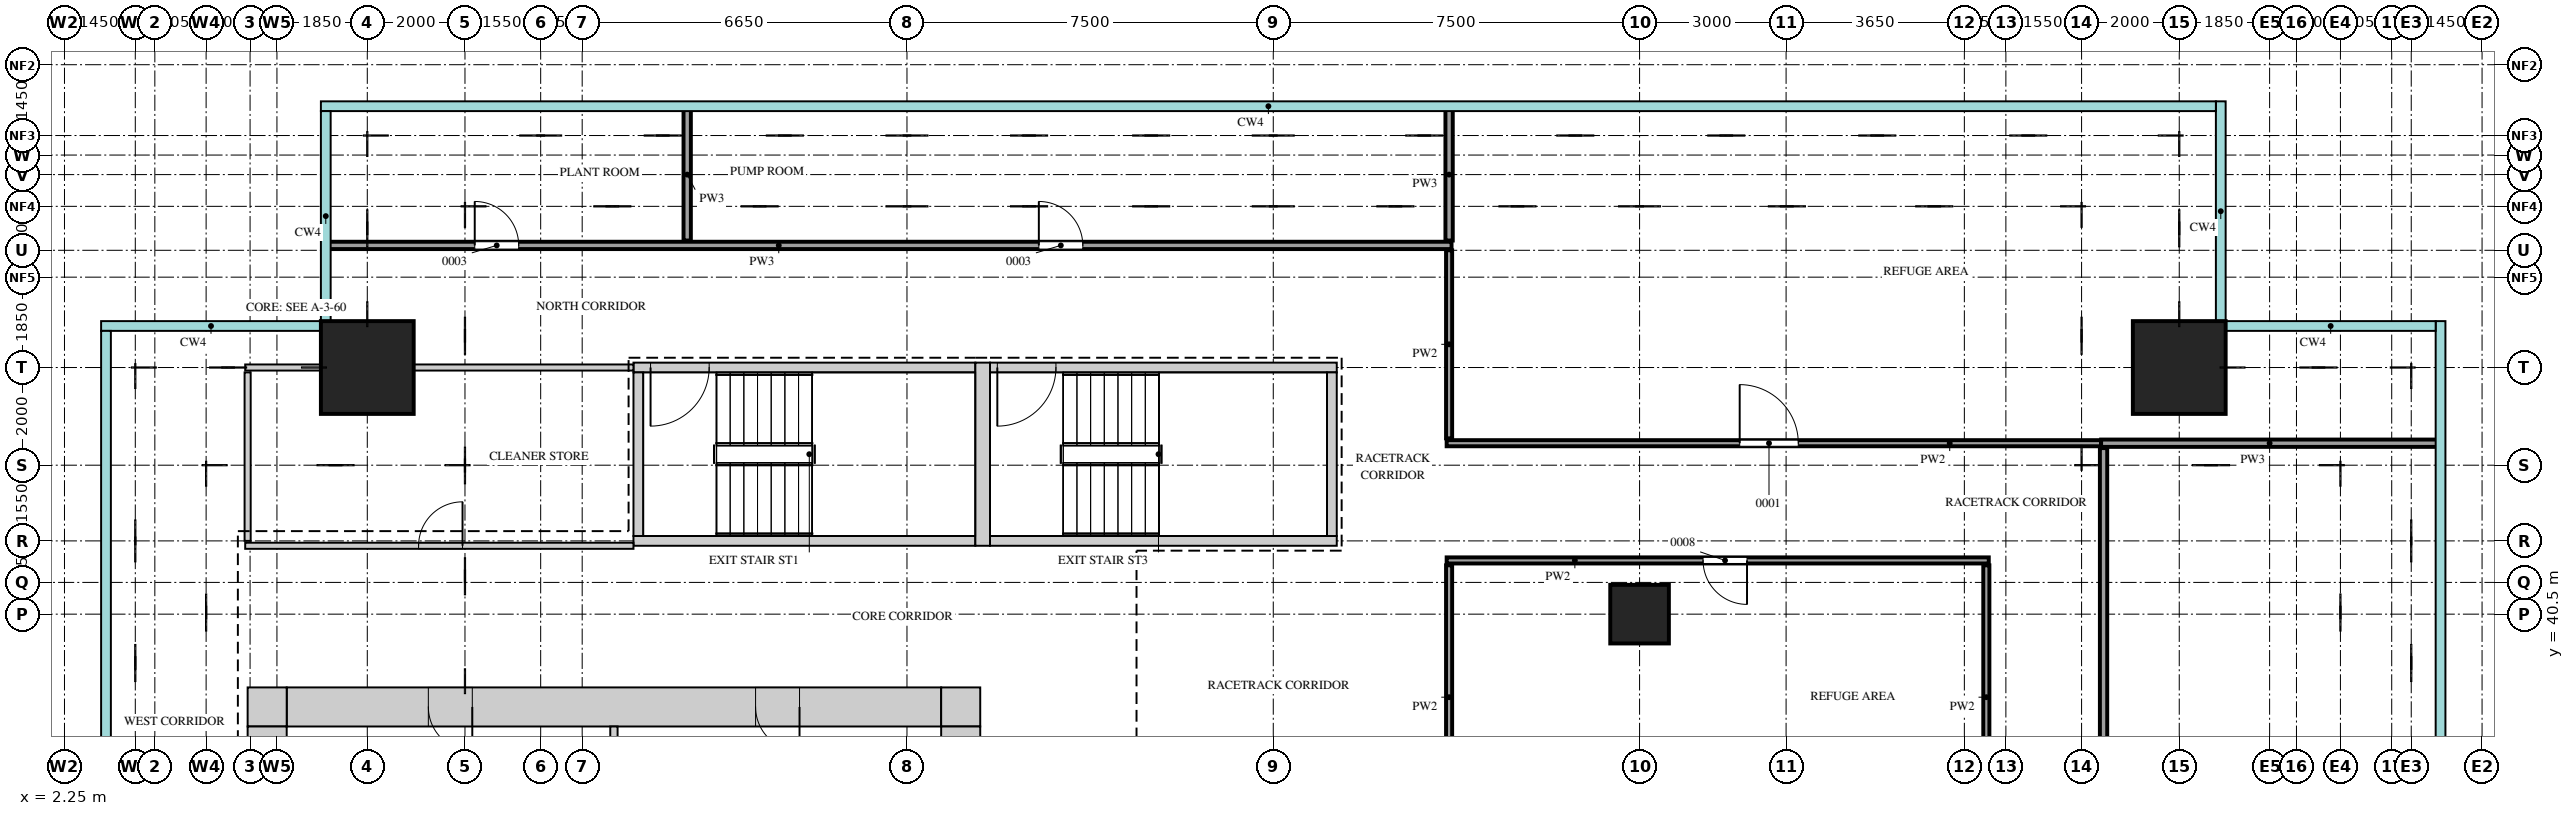
"""IFC4 building model, lengths in metres.
Left out: names, types, materials, properties, quantities, classifications, styles, units other than length and angle.
Written with IfcOpenShell. Run it as: python <this file> out.ifc"""

import sys

from ifc_helpers import new_model, si_unit, direction, frame, frame_2d, origin, origin_2d, place, context, subcontext, project, spatial, rectangle, extrude, source, transform, mapped, element, fill, save


model = new_model("IFC4")
c1 = context("Model", 3, precision=1e-05, world=origin(), true_north=direction((0.0, 1.0)))
c2 = subcontext(c1, "Body", "Model", "MODEL_VIEW")
j1 = project(units=[si_unit("LENGTHUNIT", "METRE"), si_unit("PLANEANGLEUNIT", "RADIAN")], contexts=[c1])
p1 = place(None, origin())
s1 = spatial("IfcSite", under=j1, at=p1, CompositionType="ELEMENT")
p2 = place(p1, origin())
s2 = spatial("IfcBuilding", under=s1, at=p2, CompositionType="ELEMENT")
p3 = place(p2, frame((0.0, 0.0, 216.7)))
s3 = spatial("IfcBuildingStorey", under=s2, at=p3, CompositionType="ELEMENT", Elevation=216.7)
m1 = source(origin(), c2, "Body", "SweptSolid", [
    extrude(rectangle(XDim=13.4, YDim=0.8, at=frame_2d((6.7, 0.0))), origin(), (0.0, 0.0, 1.0), 5.25),
])
p4 = place(p3, frame((6.8, 38.6, 0.0), z_axis=(0.0, 0.0, 1.0), x_axis=(1.0, 0.0, 0.0)))
e1 = element("IfcWall", 1, at=p4, inside=s3, PredefinedType="SHEAR", context=c2, shape_type="MappedRepresentation", body=[
    mapped(m1, transform((0.0, 0.0, 0.0))),
])
m2 = source(origin(), c2, "Body", "SweptSolid", [
    extrude(rectangle(XDim=0.9, YDim=2.1, at=frame_2d((0.45, 1.05))), frame((0.0, 0.41, 0.0), z_axis=(0.0, -1.0, 0.0), x_axis=(1.0, 0.0, 0.0)), (0.0, 0.0, 1.0), 0.82),
])
p5 = place(p4, frame((2.9, 0.0, 0.0)))
e2 = element("IfcOpeningElement", 2, at=p5, cuts=e1, PredefinedType="OPENING", context=c2, shape_type="MappedRepresentation", body=[
    mapped(m2, transform((0.0, 0.0, 0.0))),
])
p6 = place(p4, frame((9.6, 0.0, 0.0)))
e3 = element("IfcOpeningElement", 3, at=p6, cuts=e1, PredefinedType="OPENING", context=c2, shape_type="MappedRepresentation", body=[
    mapped(m2, transform((0.0, 0.0, 0.0))),
])
m3 = source(origin(), c2, "Body", "SweptSolid", [
    extrude(rectangle(XDim=0.8, YDim=0.8, at=frame_2d((0.4, 0.0))), origin(), (0.0, 0.0, 1.0), 5.25),
])
for number, where, z_axis, x_axis in (
    (4, (20.2, 38.6, 0.0), (0.0, 0.0, 1.0), (1.0, 0.0, 0.0)),
    (5, (6.0, 38.6, 0.0), (0.0, 0.0, 1.0), (1.0, 0.0, 0.0)),
):
    element("IfcWall", number, at=place(p3, frame(where, z_axis=z_axis, x_axis=x_axis)), inside=s3, PredefinedType="SHEAR", context=c2, shape_type="MappedRepresentation", body=[
        mapped(m3, transform((0.0, 0.0, 0.0))),
    ])
m4 = source(origin(), c2, "Body", "SweptSolid", [
    extrude(rectangle(XDim=22.4, YDim=0.8, at=frame_2d((11.2, 0.0))), origin(), (0.0, 0.0, 1.0), 5.25),
])
p7 = place(p3, frame((20.6, 15.8, 0.0), z_axis=(0.0, 0.0, 1.0), x_axis=(0.0, 1.0, 0.0)))
e6 = element("IfcWall", 6, at=p7, inside=s3, PredefinedType="SHEAR", context=c2, shape_type="MappedRepresentation", body=[
    mapped(m4, transform((0.0, 0.0, 0.0))),
])
m5 = source(origin(), c2, "Body", "SweptSolid", [
    extrude(rectangle(XDim=1.8, YDim=2.1, at=frame_2d((0.9, 1.05))), frame((0.0, 0.41, 0.0), z_axis=(0.0, -1.0, 0.0), x_axis=(1.0, 0.0, 0.0)), (0.0, 0.0, 1.0), 0.82),
])
p8 = place(p7, frame((10.7, 0.0, 0.0)))
e7 = element("IfcOpeningElement", 7, at=p8, cuts=e6, PredefinedType="OPENING", context=c2, shape_type="MappedRepresentation", body=[
    mapped(m5, transform((0.0, 0.0, 0.0))),
])
p9 = place(p7, frame((1.35, 0.0, 0.0)))
e8 = element("IfcOpeningElement", 8, at=p9, cuts=e6, PredefinedType="OPENING", context=c2, shape_type="MappedRepresentation", body=[
    mapped(m2, transform((0.0, 0.0, 0.0))),
])
p10 = place(p7, frame((4.9, 0.0, 0.0)))
e9 = element("IfcOpeningElement", 9, at=p10, cuts=e6, PredefinedType="OPENING", context=c2, shape_type="MappedRepresentation", body=[
    mapped(m2, transform((0.0, 0.0, 0.0))),
])
p11 = place(p3, frame((6.4, 15.8, 0.0), z_axis=(0.0, 0.0, 1.0), x_axis=(0.0, 1.0, 0.0)))
e10 = element("IfcWall", 10, at=p11, inside=s3, PredefinedType="SHEAR", context=c2, shape_type="MappedRepresentation", body=[
    mapped(m4, transform((0.0, 0.0, 0.0))),
])
m6 = source(origin(), c2, "Body", "SweptSolid", [
    extrude(rectangle(XDim=7.0, YDim=0.2, at=frame_2d((3.5, 0.0))), origin(), (0.0, 0.0, 1.0), 5.25),
])
p12 = place(p3, frame((13.9, 45.55, 0.0), z_axis=(0.0, 0.0, 1.0), x_axis=(1.0, 0.0, 0.0)))
e11 = element("IfcWall", 11, at=p12, inside=s3, PredefinedType="SHEAR", context=c2, shape_type="MappedRepresentation", body=[
    mapped(m6, transform((0.0, 0.0, 0.0))),
])
m7 = source(origin(), c2, "Body", "SweptSolid", [
    extrude(rectangle(XDim=1.2, YDim=2.1, at=frame_2d((0.6, 1.05))), frame((0.0, 0.11, 0.0), z_axis=(0.0, -1.0, 0.0), x_axis=(1.0, 0.0, 0.0)), (0.0, 0.0, 1.0), 0.22),
])
p13 = place(p12, frame((0.35, 0.0, 0.0)))
e12 = element("IfcOpeningElement", 12, at=p13, cuts=e11, PredefinedType="OPENING", context=c2, shape_type="MappedRepresentation", body=[
    mapped(m7, transform((0.0, 0.0, 0.0))),
])
p14 = place(p3, frame((13.9, 42.0, 0.0), z_axis=(0.0, 0.0, 1.0), x_axis=(1.0, 0.0, 0.0)))
e13 = element("IfcWall", 13, at=p14, inside=s3, PredefinedType="SHEAR", context=c2, shape_type="MappedRepresentation", body=[
    mapped(m6, transform((0.0, 0.0, 0.0))),
])
m8 = source(origin(), c2, "Body", "SweptSolid", [
    extrude(rectangle(XDim=7.1, YDim=0.2, at=frame_2d((3.55, 0.0))), origin(), (0.0, 0.0, 1.0), 5.25),
])
p15 = place(p3, frame((21.2, 45.55, 0.0), z_axis=(0.0, 0.0, 1.0), x_axis=(1.0, 0.0, 0.0)))
e14 = element("IfcWall", 14, at=p15, inside=s3, PredefinedType="SHEAR", context=c2, shape_type="MappedRepresentation", body=[
    mapped(m8, transform((0.0, 0.0, 0.0))),
])
p16 = place(p15, frame((0.15, 0.0, 0.0)))
e15 = element("IfcOpeningElement", 15, at=p16, cuts=e14, PredefinedType="OPENING", context=c2, shape_type="MappedRepresentation", body=[
    mapped(m7, transform((0.0, 0.0, 0.0))),
])
p17 = place(p3, frame((21.2, 42.0, 0.0), z_axis=(0.0, 0.0, 1.0), x_axis=(1.0, 0.0, 0.0)))
e16 = element("IfcWall", 16, at=p17, inside=s3, PredefinedType="SHEAR", context=c2, shape_type="MappedRepresentation", body=[
    mapped(m8, transform((0.0, 0.0, 0.0))),
])
m9 = source(origin(), c2, "Body", "SweptSolid", [
    extrude(rectangle(XDim=3.75, YDim=0.3, at=frame_2d((1.875, 0.0))), origin(), (0.0, 0.0, 1.0), 5.25),
])
p18 = place(p3, frame((21.05, 41.9, 0.0), z_axis=(0.0, 0.0, 1.0), x_axis=(0.0, 1.0, 0.0)))
e17 = element("IfcWall", 17, at=p18, inside=s3, PredefinedType="SHEAR", context=c2, shape_type="MappedRepresentation", body=[
    mapped(m9, transform((0.0, 0.0, 0.0))),
])
m10 = source(origin(), c2, "Body", "SweptSolid", [
    extrude(rectangle(XDim=3.35, YDim=0.2, at=frame_2d((1.675, 0.0))), origin(), (0.0, 0.0, 1.0), 5.25),
])
for number, where, z_axis, x_axis in (
    (18, (14.0, 42.1, 0.0), (0.0, 0.0, 1.0), (0.0, 1.0, 0.0)),
    (19, (28.2, 42.1, 0.0), (0.0, 0.0, 1.0), (0.0, 1.0, 0.0)),
):
    element("IfcWall", number, at=place(p3, frame(where, z_axis=z_axis, x_axis=x_axis)), inside=s3, PredefinedType="SHEAR", context=c2, shape_type="MappedRepresentation", body=[
        mapped(m10, transform((0.0, 0.0, 0.0))),
    ])
m11 = source(origin(), c2, "Body", "SweptSolid", [
    extrude(rectangle(XDim=1.9, YDim=1.9, at=origin_2d()), origin(), (0.0, 0.0, 1.0), 5.5),
])
for number, where, z_axis, x_axis in (
    (20, (45.55, 45.55, 0.0), (0.0, 0.0, 1.0), (1.0, 0.0, 0.0)),
    (21, (8.45, 45.55, 0.0), (0.0, 0.0, 1.0), (1.0, 0.0, 0.0)),
):
    element("IfcColumn", number, at=place(p3, frame(where, z_axis=z_axis, x_axis=x_axis)), inside=s3, PredefinedType="COLUMN", context=c2, shape_type="MappedRepresentation", body=[
        mapped(m11, transform((0.0, 0.0, 0.0))),
    ])
m12 = source(origin(), c2, "Body", "SweptSolid", [
    extrude(rectangle(XDim=1.2, YDim=1.2, at=origin_2d()), origin(), (0.0, 0.0, 1.0), 5.25),
])
p19 = place(p3, frame((34.5, 40.5, 0.0), z_axis=(0.0, 0.0, 1.0), x_axis=(1.0, 0.0, 0.0)))
e22 = element("IfcColumn", 22, at=p19, inside=s3, PredefinedType="COLUMN", context=c2, shape_type="MappedRepresentation", body=[
    mapped(m12, transform((0.0, 0.0, 0.0))),
])
m13 = source(origin(), c2, "Body", "SweptSolid", [
    extrude(rectangle(XDim=33.8, YDim=0.15, at=frame_2d((16.9, 0.0))), origin(), (0.0, 0.0, 1.0), 5.25),
])
p20 = place(p3, frame((44.0, 10.1, 0.0), z_axis=(0.0, 0.0, 1.0), x_axis=(0.0, 1.0, 0.0)))
e23 = element("IfcWall", 23, at=p20, inside=s3, PredefinedType="PARTITIONING", context=c2, shape_type="MappedRepresentation", body=[
    mapped(m13, transform((0.0, 0.0, 0.0))),
])
m14 = source(origin(), c2, "Body", "SweptSolid", [
    extrude(rectangle(XDim=0.9, YDim=2.1, at=frame_2d((0.45, 1.05))), frame((0.0, 0.085, 0.0), z_axis=(0.0, -1.0, 0.0), x_axis=(1.0, 0.0, 0.0)), (0.0, 0.0, 1.0), 0.17),
])
p21 = place(p20, frame((7.5, 0.0, 0.0)))
e24 = element("IfcOpeningElement", 24, at=p21, cuts=e23, PredefinedType="OPENING", context=c2, shape_type="MappedRepresentation", body=[
    mapped(m14, transform((0.0, 0.0, 0.0))),
])
m15 = source(origin(), c2, "Body", "SweptSolid", [
    extrude(rectangle(XDim=1.2, YDim=2.1, at=frame_2d((0.6, 1.05))), frame((0.0, 0.085, 0.0), z_axis=(0.0, -1.0, 0.0), x_axis=(1.0, 0.0, 0.0)), (0.0, 0.0, 1.0), 0.17),
])
p22 = place(p20, frame((22.1, 0.0, 0.0)))
e25 = element("IfcOpeningElement", 25, at=p22, cuts=e23, PredefinedType="OPENING", context=c2, shape_type="MappedRepresentation", body=[
    mapped(m15, transform((0.0, 0.0, 0.0))),
])
m16 = source(origin(), c2, "Body", "SweptSolid", [
    extrude(rectangle(XDim=6.0, YDim=0.15, at=frame_2d((3.0, 0.0))), origin(), (0.0, 0.0, 1.0), 5.25),
])
p23 = place(p3, frame((13.5, 32.2, 0.0), z_axis=(0.0, 0.0, 1.0), x_axis=(0.0, 1.0, 0.0)))
e26 = element("IfcWall", 26, at=p23, inside=s3, PredefinedType="PARTITIONING", context=c2, shape_type="MappedRepresentation", body=[
    mapped(m16, transform((0.0, 0.0, 0.0))),
])
m17 = source(origin(), c2, "Body", "SweptSolid", [
    extrude(rectangle(XDim=5.4, YDim=0.125, at=frame_2d((2.7, 0.0))), origin(), (0.0, 0.0, 1.0), 5.25),
])
for number, where, z_axis, x_axis in (
    (27, (30.6, 36.1, 0.0), (0.0, 0.0, 1.0), (0.0, 1.0, 0.0)),
    (28, (41.6, 36.1, 0.0), (0.0, 0.0, 1.0), (0.0, 1.0, 0.0)),
):
    element("IfcWall", number, at=place(p3, frame(where, z_axis=z_axis, x_axis=x_axis)), inside=s3, PredefinedType="PARTITIONING", context=c2, shape_type="MappedRepresentation", body=[
        mapped(m17, transform((0.0, 0.0, 0.0))),
    ])
m18 = source(origin(), c2, "Body", "SweptSolid", [
    extrude(rectangle(XDim=11.1, YDim=0.125, at=frame_2d((5.55, 0.0))), origin(), (0.0, 0.0, 1.0), 5.25),
])
p24 = place(p3, frame((30.55, 41.6, 0.0), z_axis=(0.0, 0.0, 1.0), x_axis=(1.0, 0.0, 0.0)))
e29 = element("IfcWall", 29, at=p24, inside=s3, PredefinedType="PARTITIONING", context=c2, shape_type="MappedRepresentation", body=[
    mapped(m18, transform((0.0, 0.0, 0.0))),
])
m19 = source(origin(), c2, "Body", "SweptSolid", [
    extrude(rectangle(XDim=0.9, YDim=2.1, at=frame_2d((0.45, 1.05))), frame((0.0, 0.073, 0.0), z_axis=(0.0, -1.0, 0.0), x_axis=(1.0, 0.0, 0.0)), (0.0, 0.0, 1.0), 0.145),
])
p25 = place(p24, frame((5.25, 0.0, 0.0)))
e30 = element("IfcOpeningElement", 30, at=p25, cuts=e29, PredefinedType="OPENING", context=c2, shape_type="MappedRepresentation", body=[
    mapped(m19, transform((0.0, 0.0, 0.0))),
])
m20 = source(origin(), c2, "Body", "SweptSolid", [
    extrude(rectangle(XDim=7.95, YDim=0.125, at=frame_2d((3.975, 0.0))), origin(), (0.0, 0.0, 1.0), 5.25),
])
p26 = place(p3, frame((5.95, 41.9, 0.0), z_axis=(0.0, 0.0, 1.0), x_axis=(1.0, 0.0, 0.0)))
e31 = element("IfcWall", 31, at=p26, inside=s3, PredefinedType="PARTITIONING", context=c2, shape_type="MappedRepresentation", body=[
    mapped(m20, transform((0.0, 0.0, 0.0))),
])
p27 = place(p26, frame((3.55, 0.0, 0.0)))
e32 = element("IfcOpeningElement", 32, at=p27, cuts=e31, PredefinedType="OPENING", context=c2, shape_type="MappedRepresentation", body=[
    mapped(m19, transform((0.0, 0.0, 0.0))),
])
m21 = source(origin(), c2, "Body", "SweptSolid", [
    extrude(rectangle(XDim=3.45, YDim=0.125, at=frame_2d((1.725, 0.0))), origin(), (0.0, 0.0, 1.0), 5.25),
])
p28 = place(p3, frame((6.0, 42.0, 0.0), z_axis=(0.0, 0.0, 1.0), x_axis=(0.0, 1.0, 0.0)))
e33 = element("IfcWall", 33, at=p28, inside=s3, PredefinedType="PARTITIONING", context=c2, shape_type="MappedRepresentation", body=[
    mapped(m21, transform((0.0, 0.0, 0.0))),
])
m22 = source(origin(), c2, "Body", "SweptSolid", [
    extrude(rectangle(XDim=13.4, YDim=0.125, at=frame_2d((6.7, 0.0))), origin(), (0.0, 0.0, 1.0), 5.25),
])
p29 = place(p3, frame((30.55, 44.0, 0.0), z_axis=(0.0, 0.0, 1.0), x_axis=(1.0, 0.0, 0.0)))
e34 = element("IfcWall", 34, at=p29, inside=s3, PredefinedType="PARTITIONING", context=c2, shape_type="MappedRepresentation", body=[
    mapped(m22, transform((0.0, 0.0, 0.0))),
])
m23 = source(origin(), c2, "Body", "SweptSolid", [
    extrude(rectangle(XDim=1.2, YDim=2.1, at=frame_2d((0.6, 1.05))), frame((0.0, 0.073, 0.0), z_axis=(0.0, -1.0, 0.0), x_axis=(1.0, 0.0, 0.0)), (0.0, 0.0, 1.0), 0.145),
])
p30 = place(p29, frame((6.0, 0.0, 0.0)))
e35 = element("IfcOpeningElement", 35, at=p30, cuts=e34, PredefinedType="OPENING", context=c2, shape_type="MappedRepresentation", body=[
    mapped(m23, transform((0.0, 0.0, 0.0))),
])
m24 = source(origin(), c2, "Body", "SweptSolid", [
    extrude(rectangle(XDim=6.9, YDim=0.15, at=frame_2d((3.45, 0.0))), origin(), (0.0, 0.0, 1.0), 5.25),
])
p31 = place(p3, frame((43.95, 44.0, 0.0), z_axis=(0.0, 0.0, 1.0), x_axis=(1.0, 0.0, 0.0)))
e36 = element("IfcWall", 36, at=p31, inside=s3, PredefinedType="PARTITIONING", context=c2, shape_type="MappedRepresentation", body=[
    mapped(m24, transform((0.0, 0.0, 0.0))),
])
m25 = source(origin(), c2, "Body", "SweptSolid", [
    extrude(rectangle(XDim=3.85, YDim=0.125, at=frame_2d((1.925, 0.0))), origin(), (0.0, 0.0, 1.0), 5.25),
])
p32 = place(p3, frame((30.6, 44.1, 0.0), z_axis=(0.0, 0.0, 1.0), x_axis=(0.0, 1.0, 0.0)))
e37 = element("IfcWall", 37, at=p32, inside=s3, PredefinedType="PARTITIONING", context=c2, shape_type="MappedRepresentation", body=[
    mapped(m25, transform((0.0, 0.0, 0.0))),
])
p33 = place(p3, frame((5.95, 45.55, 0.0), z_axis=(0.0, 0.0, 1.0), x_axis=(1.0, 0.0, 0.0)))
e38 = element("IfcWall", 38, at=p33, inside=s3, PredefinedType="PARTITIONING", context=c2, shape_type="MappedRepresentation", body=[
    mapped(m20, transform((0.0, 0.0, 0.0))),
])
m26 = source(origin(), c2, "Body", "SweptSolid", [
    extrude(rectangle(XDim=23.0, YDim=0.15, at=frame_2d((11.5, 0.0))), origin(), (0.0, 0.0, 1.0), 5.25),
])
p34 = place(p3, frame((7.65, 48.05, 0.0), z_axis=(0.0, 0.0, 1.0), x_axis=(1.0, 0.0, 0.0)))
e39 = element("IfcWall", 39, at=p34, inside=s3, PredefinedType="PARTITIONING", context=c2, shape_type="MappedRepresentation", body=[
    mapped(m26, transform((0.0, 0.0, 0.0))),
])
p35 = place(p34, frame((3.0, 0.0, 0.0)))
e40 = element("IfcOpeningElement", 40, at=p35, cuts=e39, PredefinedType="OPENING", context=c2, shape_type="MappedRepresentation", body=[
    mapped(m14, transform((0.0, 0.0, 0.0))),
])
p36 = place(p34, frame((14.55, 0.0, 0.0)))
e41 = element("IfcOpeningElement", 41, at=p36, cuts=e39, PredefinedType="OPENING", context=c2, shape_type="MappedRepresentation", body=[
    mapped(m14, transform((0.0, 0.0, 0.0))),
])
m27 = source(origin(), c2, "Body", "SweptSolid", [
    extrude(rectangle(XDim=2.7, YDim=0.15, at=frame_2d((1.35, 0.0))), origin(), (0.0, 0.0, 1.0), 5.25),
])
for number, where, z_axis, x_axis in (
    (42, (15.0, 48.15, 0.0), (0.0, 0.0, 1.0), (0.0, 1.0, 0.0)),
    (43, (30.6, 48.15, 0.0), (0.0, 0.0, 1.0), (0.0, 1.0, 0.0)),
):
    element("IfcWall", number, at=place(p3, frame(where, z_axis=z_axis, x_axis=x_axis)), inside=s3, PredefinedType="PARTITIONING", context=c2, shape_type="MappedRepresentation", body=[
        mapped(m27, transform((0.0, 0.0, 0.0))),
    ])
m28 = source(origin(), c2, "Body", "SweptSolid", [
    extrude(rectangle(XDim=0.9, YDim=2.1, at=frame_2d((0.45, 1.05))), frame((0.0, 0.35, 0.0), z_axis=(0.0, -1.0, 0.0), x_axis=(1.0, 0.0, 0.0)), (0.0, 0.0, 1.0), 0.7),
])
p37 = place(p5, origin())
e44 = element("IfcDoor", 44, at=p37, inside=s3, OperationType="SINGLE_SWING_RIGHT", PredefinedType="DOOR", context=c2, shape_type="MappedRepresentation", body=[
    mapped(m28, transform((0.0, 0.0, 0.0))),
])
fill(e2, e44)
p38 = place(p6, origin())
e45 = element("IfcDoor", 45, at=p38, inside=s3, OperationType="SINGLE_SWING_RIGHT", PredefinedType="DOOR", context=c2, shape_type="MappedRepresentation", body=[
    mapped(m28, transform((0.0, 0.0, 0.0))),
])
fill(e3, e45)
m29 = source(origin(), c2, "Body", "SweptSolid", [
    extrude(rectangle(XDim=1.2, YDim=2.1, at=frame_2d((0.6, 1.05))), frame((0.0, 0.025, 0.0), z_axis=(0.0, -1.0, 0.0), x_axis=(1.0, 0.0, 0.0)), (0.0, 0.0, 1.0), 0.05),
])
p39 = place(p30, origin())
e46 = element("IfcDoor", 46, at=p39, inside=s3, OperationType="SINGLE_SWING_RIGHT", PredefinedType="DOOR", context=c2, shape_type="MappedRepresentation", body=[
    mapped(m29, transform((0.0, 0.0, 0.0))),
])
fill(e35, e46)
m30 = source(origin(), c2, "Body", "SweptSolid", [
    extrude(rectangle(XDim=0.9, YDim=2.1, at=frame_2d((0.45, 1.05))), frame((0.0, 0.025, 0.0), z_axis=(0.0, -1.0, 0.0), x_axis=(1.0, 0.0, 0.0)), (0.0, 0.0, 1.0), 0.05),
])
p40 = place(p27, origin())
e47 = element("IfcDoor", 47, at=p40, inside=s3, OperationType="SINGLE_SWING_LEFT", PredefinedType="DOOR", context=c2, shape_type="MappedRepresentation", body=[
    mapped(m30, transform((0.0, 0.0, 0.0))),
])
fill(e32, e47)
p41 = place(p25, origin())
e48 = element("IfcDoor", 48, at=p41, inside=s3, OperationType="SINGLE_SWING_RIGHT", PredefinedType="DOOR", context=c2, shape_type="MappedRepresentation", body=[
    mapped(m30, transform((0.0, 0.0, 0.0))),
])
fill(e30, e48)
p42 = place(p35, origin())
e49 = element("IfcDoor", 49, at=p42, inside=s3, OperationType="SINGLE_SWING_RIGHT", PredefinedType="DOOR", context=c2, shape_type="MappedRepresentation", body=[
    mapped(m30, transform((0.0, 0.0, 0.0))),
])
fill(e40, e49)
p43 = place(p36, origin())
e50 = element("IfcDoor", 50, at=p43, inside=s3, OperationType="SINGLE_SWING_RIGHT", PredefinedType="DOOR", context=c2, shape_type="MappedRepresentation", body=[
    mapped(m30, transform((0.0, 0.0, 0.0))),
])
fill(e41, e50)
p44 = place(p13, origin())
e51 = element("IfcDoor", 51, at=p44, inside=s3, OperationType="SINGLE_SWING_LEFT", PredefinedType="DOOR", context=c2, shape_type="MappedRepresentation", body=[
    mapped(m29, transform((0.0, 0.0, 0.0))),
])
fill(e12, e51)
p45 = place(p16, origin())
e52 = element("IfcDoor", 52, at=p45, inside=s3, OperationType="SINGLE_SWING_LEFT", PredefinedType="DOOR", context=c2, shape_type="MappedRepresentation", body=[
    mapped(m29, transform((0.0, 0.0, 0.0))),
])
fill(e15, e52)
save(model, sys.argv[1])
